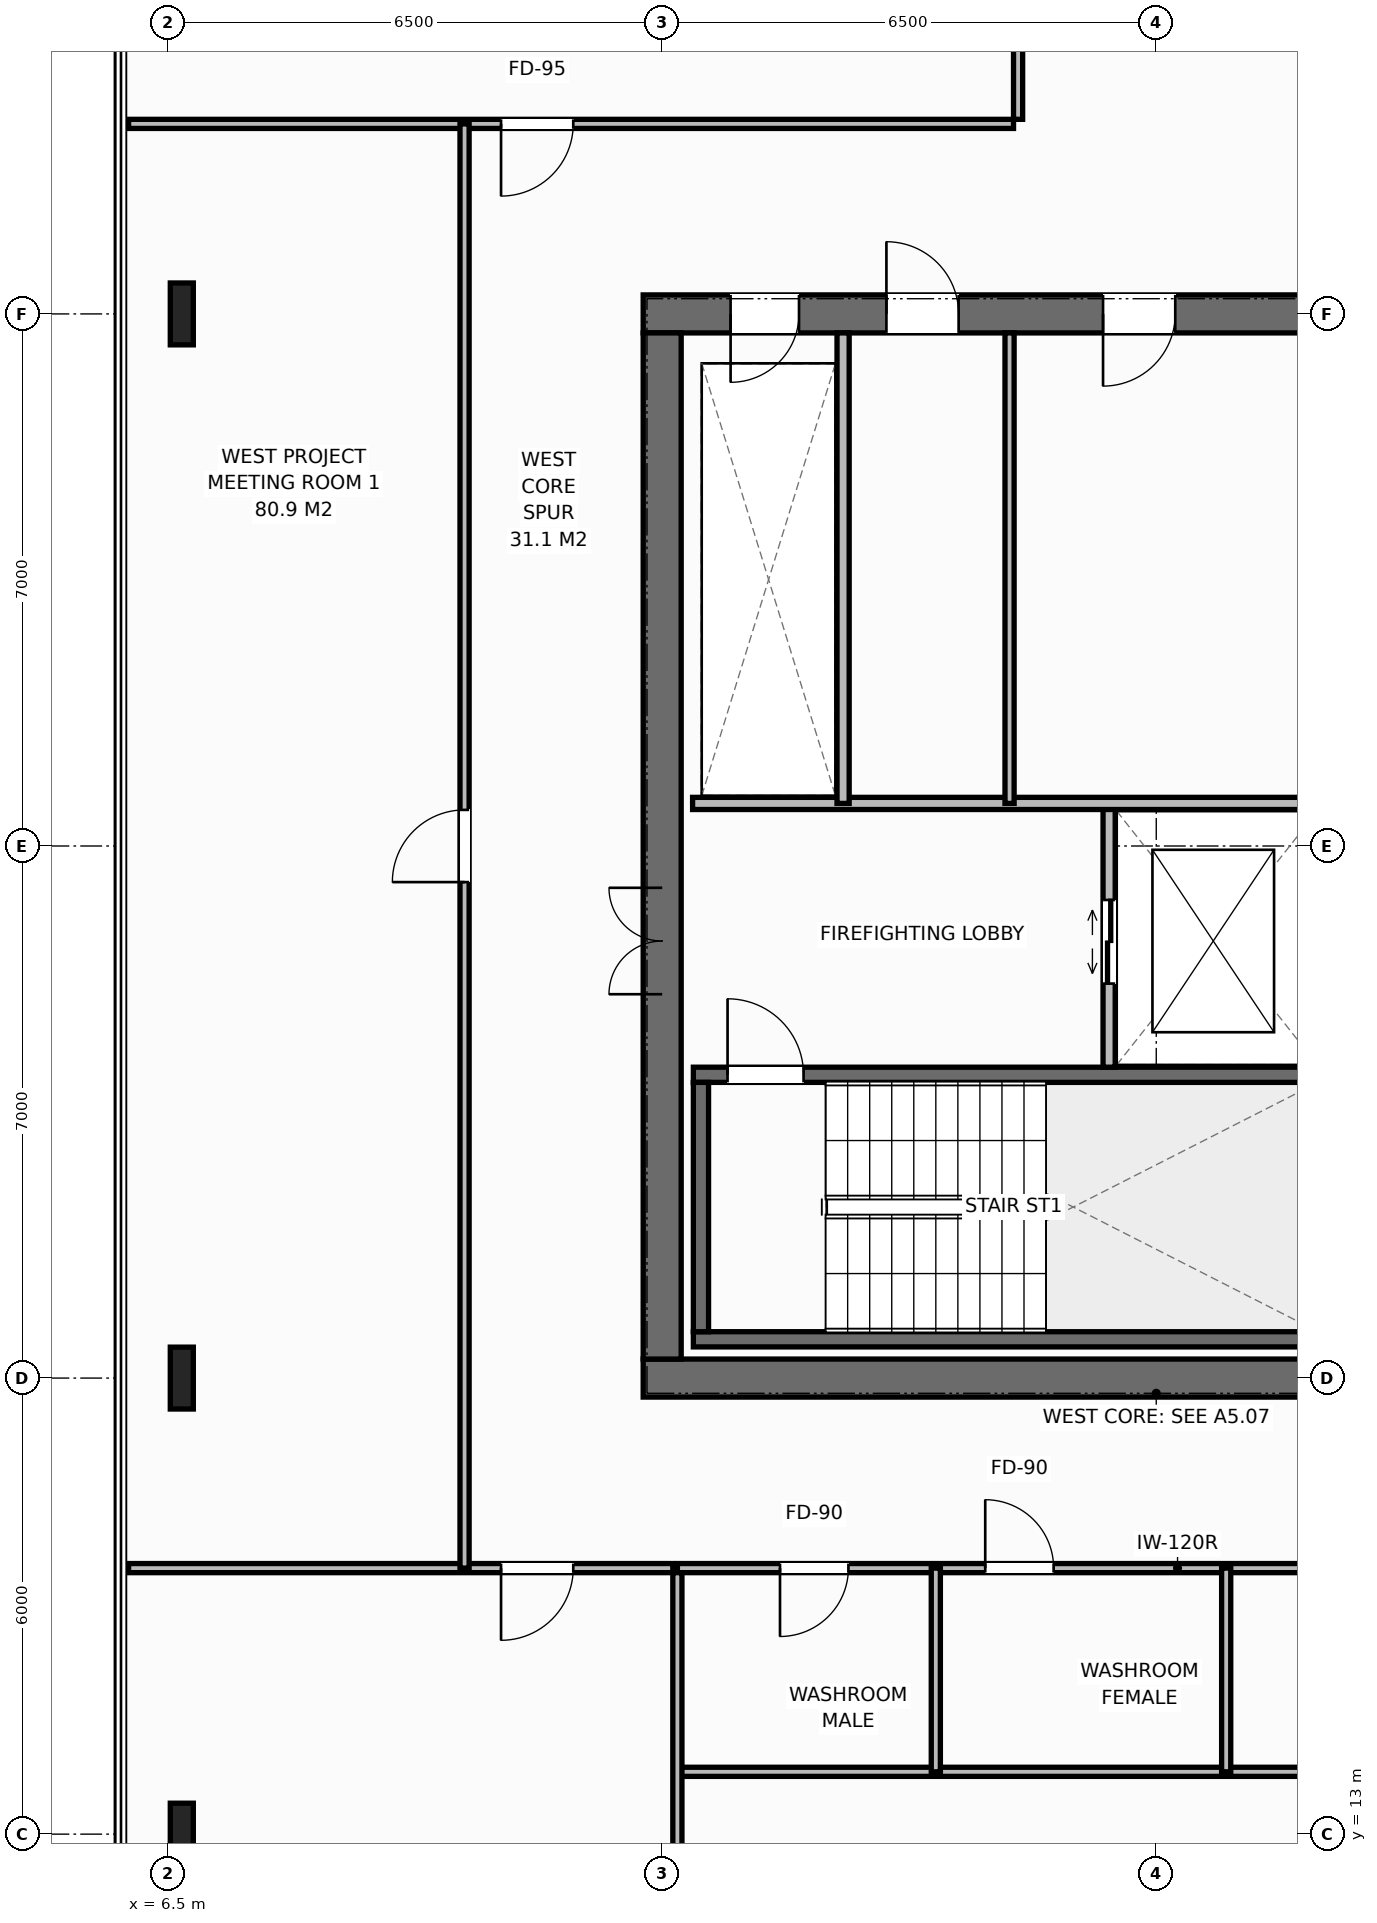
"""IFC4 building model, lengths in metres.
Left out: names, types, materials, properties, quantities, classifications, styles, units other than length and angle.
Written with IfcOpenShell. Run it as: python <this file> out.ifc"""

import sys

from ifc_helpers import new_model, si_unit, direction, frame, frame_2d, origin, origin_2d, place, context, subcontext, project, spatial, rectangle, i_section, extrude, element, fill, save


model = new_model("IFC4")
c1 = context("Model", 3, precision=1e-05, world=origin(), true_north=direction((0.0, 1.0)))
c2 = subcontext(c1, "Body", "Model", "MODEL_VIEW")
j1 = project(units=[si_unit("LENGTHUNIT", "METRE"), si_unit("PLANEANGLEUNIT", "RADIAN")], contexts=[c1])
p1 = place(None, origin())
s1 = spatial("IfcSite", under=j1, at=p1, CompositionType="ELEMENT")
p2 = place(p1, origin())
s2 = spatial("IfcBuilding", under=s1, at=p2, CompositionType="ELEMENT")
p3 = place(p2, frame((0.0, 0.0, 240.4)))
s3 = spatial("IfcBuildingStorey", under=s2, at=p3, CompositionType="ELEMENT", Elevation=240.4)
p4 = place(p3, frame((12.75, 19.0, 0.0), z_axis=(0.0, 0.0, 1.0), x_axis=(1.0, 0.0, 0.0)))
e1 = element("IfcWall", 1, at=p4, inside=s3, PredefinedType="SHEAR", context=c2, shape_type="SweptSolid", body=[
    extrude(rectangle(XDim=13.5, YDim=0.5, at=frame_2d((6.75, 0.0))), origin(), (0.0, 0.0, 1.0), 3.8),
])
p5 = place(p4, frame((9.13, 0.0, 0.0)))
e2 = element("IfcOpeningElement", 2, at=p5, cuts=e1, PredefinedType="OPENING", context=c2, shape_type="SweptSolid", body=[
    extrude(rectangle(XDim=1.4, YDim=2.2, at=frame_2d((0.7, 1.1))), frame((0.0, 0.26, 0.0), z_axis=(0.0, -1.0, 0.0), x_axis=(1.0, 0.0, 0.0)), (0.0, 0.0, 1.0), 0.52),
])
p6 = place(p3, frame((12.75, 33.0, 0.0), z_axis=(0.0, 0.0, 1.0), x_axis=(1.0, 0.0, 0.0)))
e3 = element("IfcWall", 3, at=p6, inside=s3, PredefinedType="SHEAR", context=c2, shape_type="SweptSolid", body=[
    extrude(rectangle(XDim=13.5, YDim=0.5, at=frame_2d((6.75, 0.0))), origin(), (0.0, 0.0, 1.0), 3.8),
])
p7 = place(p6, frame((1.15, 0.0, 0.0)))
e4 = element("IfcOpeningElement", 4, at=p7, cuts=e3, PredefinedType="OPENING", context=c2, shape_type="SweptSolid", body=[
    extrude(rectangle(XDim=0.9, YDim=2.15, at=frame_2d((0.45, 1.075))), frame((0.0, 0.26, 0.0), z_axis=(0.0, -1.0, 0.0), x_axis=(1.0, 0.0, 0.0)), (0.0, 0.0, 1.0), 0.52),
])
p8 = place(p6, frame((3.2, 0.0, 0.0)))
e5 = element("IfcOpeningElement", 5, at=p8, cuts=e3, PredefinedType="OPENING", context=c2, shape_type="SweptSolid", body=[
    extrude(rectangle(XDim=0.95, YDim=2.15, at=frame_2d((0.475, 1.075))), frame((0.0, 0.26, 0.0), z_axis=(0.0, -1.0, 0.0), x_axis=(1.0, 0.0, 0.0)), (0.0, 0.0, 1.0), 0.52),
])
p9 = place(p6, frame((6.05, 0.0, 0.0)))
e6 = element("IfcOpeningElement", 6, at=p9, cuts=e3, PredefinedType="OPENING", context=c2, shape_type="SweptSolid", body=[
    extrude(rectangle(XDim=0.95, YDim=2.15, at=frame_2d((0.475, 1.075))), frame((0.0, 0.26, 0.0), z_axis=(0.0, -1.0, 0.0), x_axis=(1.0, 0.0, 0.0)), (0.0, 0.0, 1.0), 0.52),
])
p10 = place(p6, frame((9.13, 0.0, 0.0)))
e7 = element("IfcOpeningElement", 7, at=p10, cuts=e3, PredefinedType="OPENING", context=c2, shape_type="SweptSolid", body=[
    extrude(rectangle(XDim=1.4, YDim=2.2, at=frame_2d((0.7, 1.1))), frame((0.0, 0.26, 0.0), z_axis=(0.0, -1.0, 0.0), x_axis=(1.0, 0.0, 0.0)), (0.0, 0.0, 1.0), 0.52),
])
p11 = place(p3, frame((13.0, 19.25, 0.0), z_axis=(0.0, 0.0, 1.0), x_axis=(0.0, 1.0, 0.0)))
e8 = element("IfcWall", 8, at=p11, inside=s3, PredefinedType="SHEAR", context=c2, shape_type="SweptSolid", body=[
    extrude(rectangle(XDim=13.5, YDim=0.5, at=frame_2d((6.75, 0.0))), origin(), (0.0, 0.0, 1.0), 3.8),
])
p12 = place(p11, frame((4.8, 0.0, 0.0)))
e9 = element("IfcOpeningElement", 9, at=p12, cuts=e8, PredefinedType="OPENING", context=c2, shape_type="SweptSolid", body=[
    extrude(rectangle(XDim=1.4, YDim=2.2, at=frame_2d((0.7, 1.1))), frame((0.0, 0.26, 0.0), z_axis=(0.0, -1.0, 0.0), x_axis=(1.0, 0.0, 0.0)), (0.0, 0.0, 1.0), 0.52),
])
p13 = place(p3, frame((13.41, 19.51, 0.0), z_axis=(0.0, 0.0, 1.0), x_axis=(1.0, 0.0, 0.0)))
e10 = element("IfcWall", 10, at=p13, inside=s3, PredefinedType="SHEAR", context=c2, shape_type="SweptSolid", body=[
    extrude(rectangle(XDim=8.43, YDim=0.2, at=frame_2d((4.215, 0.0))), origin(), (0.0, 0.0, 1.0), 3.8),
])
p14 = place(p3, frame((13.41, 22.99, 0.0), z_axis=(0.0, 0.0, 1.0), x_axis=(1.0, 0.0, 0.0)))
e11 = element("IfcWall", 11, at=p14, inside=s3, PredefinedType="SHEAR", context=c2, shape_type="SweptSolid", body=[
    extrude(rectangle(XDim=8.43, YDim=0.2, at=frame_2d((4.215, 0.0))), origin(), (0.0, 0.0, 1.0), 3.8),
])
p15 = place(p14, frame((0.45, 0.0, 0.0)))
e12 = element("IfcOpeningElement", 12, at=p15, cuts=e11, PredefinedType="OPENING", context=c2, shape_type="SweptSolid", body=[
    extrude(rectangle(XDim=1.0, YDim=2.15, at=frame_2d((0.5, 1.075))), frame((0.0, 0.11, 0.0), z_axis=(0.0, -1.0, 0.0), x_axis=(1.0, 0.0, 0.0)), (0.0, 0.0, 1.0), 0.22),
])
p16 = place(p3, frame((13.51, 19.61, 0.0), z_axis=(0.0, 0.0, 1.0), x_axis=(0.0, 1.0, 0.0)))
e13 = element("IfcWall", 13, at=p16, inside=s3, PredefinedType="SHEAR", context=c2, shape_type="SweptSolid", body=[
    extrude(rectangle(XDim=3.28, YDim=0.2, at=frame_2d((1.64, 0.0))), origin(), (0.0, 0.0, 1.0), 3.8),
])
for number, where, z_axis, x_axis in (
    (14, (6.68, 13.0, 0.0), (0.0, 0.0, 1.0), (1.0, 0.0, 0.0)),
    (15, (6.68, 19.0, 0.0), (0.0, 0.0, 1.0), (1.0, 0.0, 0.0)),
    (16, (6.68, 33.0, 0.0), (0.0, 0.0, 1.0), (1.0, 0.0, 0.0)),
):
    element("IfcColumn", number, at=place(p3, frame(where, z_axis=z_axis, x_axis=x_axis)), inside=s3, PredefinedType="COLUMN", context=c2, shape_type="SweptSolid", body=[
        extrude(i_section(OverallWidth=0.303, OverallDepth=0.814, WebThickness=0.021, FlangeThickness=0.04, at=origin_2d()), origin(), (0.0, 0.0, 1.0), 3.8),
    ])
p17 = place(p3, frame((18.88, 23.09, 0.0), z_axis=(0.0, 0.0, 1.0), x_axis=(0.0, 1.0, 0.0)))
e17 = element("IfcWall", 17, at=p17, inside=s3, PredefinedType="STANDARD", context=c2, shape_type="SweptSolid", body=[
    extrude(rectangle(XDim=3.47, YDim=0.16, at=frame_2d((1.735, 0.0))), origin(), (0.0, 0.0, 1.0), 3.58),
])
p18 = place(p17, frame((1.1, 0.0, 0.0)))
e18 = element("IfcOpeningElement", 18, at=p18, cuts=e17, PredefinedType="OPENING", context=c2, shape_type="SweptSolid", body=[
    extrude(rectangle(XDim=1.1, YDim=2.2, at=frame_2d((0.55, 1.1))), frame((0.0, 0.09, 0.0), z_axis=(0.0, -1.0, 0.0), x_axis=(1.0, 0.0, 0.0)), (0.0, 0.0, 1.0), 0.18),
])
p19 = place(p3, frame((13.4, 26.56, 0.0), z_axis=(0.0, 0.0, 1.0), x_axis=(1.0, 0.0, 0.0)))
e19 = element("IfcWall", 19, at=p19, inside=s3, PredefinedType="STANDARD", context=c2, shape_type="SweptSolid", body=[
    extrude(rectangle(XDim=8.34, YDim=0.16, at=frame_2d((4.17, 0.0))), origin(), (0.0, 0.0, 1.0), 3.58),
])
p20 = place(p3, frame((15.38, 26.56, 0.0), z_axis=(0.0, 0.0, 1.0), x_axis=(0.0, 1.0, 0.0)))
e20 = element("IfcWall", 20, at=p20, inside=s3, PredefinedType="STANDARD", context=c2, shape_type="SweptSolid", body=[
    extrude(rectangle(XDim=6.19, YDim=0.16, at=frame_2d((3.095, 0.0))), origin(), (0.0, 0.0, 1.0), 3.58),
])
p21 = place(p3, frame((17.57, 26.56, 0.0), z_axis=(0.0, 0.0, 1.0), x_axis=(0.0, 1.0, 0.0)))
e21 = element("IfcWall", 21, at=p21, inside=s3, PredefinedType="PARTITIONING", context=c2, shape_type="SweptSolid", body=[
    extrude(rectangle(XDim=6.19, YDim=0.12, at=frame_2d((3.095, 0.0))), origin(), (0.0, 0.0, 1.0), 3.58),
])
p22 = place(p3, frame((13.2, 16.5, 0.0), z_axis=(0.0, 0.0, 1.0), x_axis=(1.0, 0.0, 0.0)))
e22 = element("IfcWall", 22, at=p22, inside=s3, PredefinedType="PARTITIONING", context=c2, shape_type="SweptSolid", body=[
    extrude(rectangle(XDim=13.16, YDim=0.12, at=frame_2d((6.58, 0.0))), origin(), (0.0, 0.0, 1.0), 3.58),
])
p23 = place(p22, frame((1.35, 0.0, 0.0)))
e23 = element("IfcOpeningElement", 23, at=p23, cuts=e22, PredefinedType="OPENING", context=c2, shape_type="SweptSolid", body=[
    extrude(rectangle(XDim=0.9, YDim=2.15, at=frame_2d((0.45, 1.075))), frame((0.0, 0.07, 0.0), z_axis=(0.0, -1.0, 0.0), x_axis=(1.0, 0.0, 0.0)), (0.0, 0.0, 1.0), 0.14),
])
p24 = place(p22, frame((4.05, 0.0, 0.0)))
e24 = element("IfcOpeningElement", 24, at=p24, cuts=e22, PredefinedType="OPENING", context=c2, shape_type="SweptSolid", body=[
    extrude(rectangle(XDim=0.9, YDim=2.15, at=frame_2d((0.45, 1.075))), frame((0.0, 0.07, 0.0), z_axis=(0.0, -1.0, 0.0), x_axis=(1.0, 0.0, 0.0)), (0.0, 0.0, 1.0), 0.14),
])
p25 = place(p22, frame((8.25, 0.0, 0.0)))
e25 = element("IfcOpeningElement", 25, at=p25, cuts=e22, PredefinedType="OPENING", context=c2, shape_type="SweptSolid", body=[
    extrude(rectangle(XDim=0.9, YDim=2.15, at=frame_2d((0.45, 1.075))), frame((0.0, 0.07, 0.0), z_axis=(0.0, -1.0, 0.0), x_axis=(1.0, 0.0, 0.0)), (0.0, 0.0, 1.0), 0.14),
])
p26 = place(p22, frame((11.0, 0.0, 0.0)))
e26 = element("IfcOpeningElement", 26, at=p26, cuts=e22, PredefinedType="OPENING", context=c2, shape_type="SweptSolid", body=[
    extrude(rectangle(XDim=0.95, YDim=2.15, at=frame_2d((0.475, 1.075))), frame((0.0, 0.07, 0.0), z_axis=(0.0, -1.0, 0.0), x_axis=(1.0, 0.0, 0.0)), (0.0, 0.0, 1.0), 0.14),
])
p27 = place(p3, frame((13.2, 13.82, 0.0), z_axis=(0.0, 0.0, 1.0), x_axis=(1.0, 0.0, 0.0)))
e27 = element("IfcWall", 27, at=p27, inside=s3, PredefinedType="PARTITIONING", context=c2, shape_type="SweptSolid", body=[
    extrude(rectangle(XDim=13.16, YDim=0.12, at=frame_2d((6.58, 0.0))), origin(), (0.0, 0.0, 1.0), 3.58),
])
for number, where, z_axis, x_axis in (
    (28, (16.6, 13.82, 0.0), (0.0, 0.0, 1.0), (0.0, 1.0, 0.0)),
    (29, (20.42, 13.82, 0.0), (0.0, 0.0, 1.0), (0.0, 1.0, 0.0)),
):
    element("IfcWall", number, at=place(p3, frame(where, z_axis=z_axis, x_axis=x_axis)), inside=s3, PredefinedType="PARTITIONING", context=c2, shape_type="SweptSolid", body=[
        extrude(rectangle(XDim=2.68, YDim=0.12, at=frame_2d((1.34, 0.0))), origin(), (0.0, 0.0, 1.0), 3.58),
    ])
p28 = place(p3, frame((17.682, 35.56, 0.0), z_axis=(0.0, 0.0, 1.0), x_axis=(0.0, 1.0, 0.0)))
e30 = element("IfcWall", 30, at=p28, inside=s3, PredefinedType="PARTITIONING", context=c2, shape_type="SweptSolid", body=[
    extrude(rectangle(XDim=11.42, YDim=0.12, at=frame_2d((5.71, 0.0))), origin(), (0.0, 0.0, 1.0), 3.58),
])
p29 = place(p3, frame((5.98, 35.5, 0.0), z_axis=(0.0, 0.0, 1.0), x_axis=(1.0, 0.0, 0.0)))
e31 = element("IfcWall", 31, at=p29, inside=s3, PredefinedType="PARTITIONING", context=c2, shape_type="SweptSolid", body=[
    extrude(rectangle(XDim=11.642, YDim=0.12, at=frame_2d((5.821, 0.0))), origin(), (0.0, 0.0, 1.0), 3.58),
])
p30 = place(p29, frame((4.9, 0.0, 0.0)))
e32 = element("IfcOpeningElement", 32, at=p30, cuts=e31, PredefinedType="OPENING", context=c2, shape_type="SweptSolid", body=[
    extrude(rectangle(XDim=0.95, YDim=2.15, at=frame_2d((0.475, 1.075))), frame((0.0, 0.07, 0.0), z_axis=(0.0, -1.0, 0.0), x_axis=(1.0, 0.0, 0.0)), (0.0, 0.0, 1.0), 0.14),
])
p31 = place(p3, frame((13.2, 5.02, 0.0), z_axis=(0.0, 0.0, 1.0), x_axis=(0.0, 1.0, 0.0)))
e33 = element("IfcWall", 33, at=p31, inside=s3, PredefinedType="PARTITIONING", context=c2, shape_type="SweptSolid", body=[
    extrude(rectangle(XDim=11.42, YDim=0.12, at=frame_2d((5.71, 0.0))), origin(), (0.0, 0.0, 1.0), 2.88),
])
p32 = place(p3, frame((5.98, 16.5, 0.0), z_axis=(0.0, 0.0, 1.0), x_axis=(1.0, 0.0, 0.0)))
e34 = element("IfcWall", 34, at=p32, inside=s3, PredefinedType="PARTITIONING", context=c2, shape_type="SweptSolid", body=[
    extrude(rectangle(XDim=7.16, YDim=0.12, at=frame_2d((3.58, 0.0))), origin(), (0.0, 0.0, 1.0), 3.58),
])
p33 = place(p32, frame((4.9, 0.0, 0.0)))
e35 = element("IfcOpeningElement", 35, at=p33, cuts=e34, PredefinedType="OPENING", context=c2, shape_type="SweptSolid", body=[
    extrude(rectangle(XDim=0.95, YDim=2.15, at=frame_2d((0.475, 1.075))), frame((0.0, 0.07, 0.0), z_axis=(0.0, -1.0, 0.0), x_axis=(1.0, 0.0, 0.0)), (0.0, 0.0, 1.0), 0.14),
])
p34 = place(p3, frame((10.4, 16.5, 0.0), z_axis=(0.0, 0.0, 1.0), x_axis=(0.0, 1.0, 0.0)))
e36 = element("IfcWall", 36, at=p34, inside=s3, PredefinedType="PARTITIONING", context=c2, shape_type="SweptSolid", body=[
    extrude(rectangle(XDim=19.0, YDim=0.12, at=frame_2d((9.5, 0.0))), origin(), (0.0, 0.0, 1.0), 3.58),
])
p35 = place(p34, frame((9.025, 0.0, 0.0)))
e37 = element("IfcOpeningElement", 37, at=p35, cuts=e36, PredefinedType="OPENING", context=c2, shape_type="SweptSolid", body=[
    extrude(rectangle(XDim=0.95, YDim=2.15, at=frame_2d((0.475, 1.075))), frame((0.0, 0.07, 0.0), z_axis=(0.0, -1.0, 0.0), x_axis=(1.0, 0.0, 0.0)), (0.0, 0.0, 1.0), 0.14),
])
p36 = place(p15, origin())
e38 = element("IfcDoor", 38, at=p36, inside=s3, OperationType="SINGLE_SWING_LEFT", PredefinedType="DOOR", context=c2, shape_type="SweptSolid", body=[
    extrude(rectangle(XDim=1.0, YDim=2.15, at=frame_2d((0.5, 1.075))), frame((0.0, 0.025, 0.0), z_axis=(0.0, -1.0, 0.0), x_axis=(1.0, 0.0, 0.0)), (0.0, 0.0, 1.0), 0.05),
])
fill(e12, e38)
p37 = place(p12, origin())
e39 = element("IfcDoor", 39, at=p37, inside=s3, OperationType="DOUBLE_DOOR_SINGLE_SWING", PredefinedType="DOOR", context=c2, shape_type="SweptSolid", body=[
    extrude(rectangle(XDim=1.4, YDim=2.2, at=frame_2d((0.7, 1.1))), frame((0.0, 0.025, 0.0), z_axis=(0.0, -1.0, 0.0), x_axis=(1.0, 0.0, 0.0)), (0.0, 0.0, 1.0), 0.05),
])
fill(e9, e39)
p38 = place(p18, origin())
e40 = element("IfcDoor", 40, at=p38, inside=s3, OperationType="DOUBLE_DOOR_SLIDING", PredefinedType="DOOR", context=c2, shape_type="SweptSolid", body=[
    extrude(rectangle(XDim=1.1, YDim=2.2, at=frame_2d((0.55, 1.1))), frame((0.0, 0.025, 0.0), z_axis=(0.0, -1.0, 0.0), x_axis=(1.0, 0.0, 0.0)), (0.0, 0.0, 1.0), 0.05),
])
fill(e18, e40)
p39 = place(p7, origin())
e41 = element("IfcDoor", 41, at=p39, inside=s3, OperationType="SINGLE_SWING_RIGHT", PredefinedType="DOOR", context=c2, shape_type="SweptSolid", body=[
    extrude(rectangle(XDim=0.9, YDim=2.15, at=frame_2d((0.45, 1.075))), frame((0.0, -0.025, 0.0), z_axis=(0.0, -1.0, 0.0), x_axis=(1.0, 0.0, 0.0)), (0.0, 0.0, 1.0), 0.05),
])
fill(e4, e41)
p40 = place(p8, origin())
e42 = element("IfcDoor", 42, at=p40, inside=s3, OperationType="SINGLE_SWING_LEFT", PredefinedType="DOOR", context=c2, shape_type="SweptSolid", body=[
    extrude(rectangle(XDim=0.95, YDim=2.15, at=frame_2d((0.475, 1.075))), frame((0.0, -0.025, 0.0), z_axis=(0.0, -1.0, 0.0), x_axis=(1.0, 0.0, 0.0)), (0.0, 0.0, 1.0), 0.05),
])
fill(e5, e42)
p41 = place(p9, origin())
e43 = element("IfcDoor", 43, at=p41, inside=s3, OperationType="SINGLE_SWING_RIGHT", PredefinedType="DOOR", context=c2, shape_type="SweptSolid", body=[
    extrude(rectangle(XDim=0.95, YDim=2.15, at=frame_2d((0.475, 1.075))), frame((0.0, -0.025, 0.0), z_axis=(0.0, -1.0, 0.0), x_axis=(1.0, 0.0, 0.0)), (0.0, 0.0, 1.0), 0.05),
])
fill(e6, e43)
p42 = place(p23, origin())
e44 = element("IfcDoor", 44, at=p42, inside=s3, OperationType="SINGLE_SWING_RIGHT", PredefinedType="DOOR", context=c2, shape_type="SweptSolid", body=[
    extrude(rectangle(XDim=0.9, YDim=2.15, at=frame_2d((0.45, 1.075))), frame((0.0, 0.025, 0.0), z_axis=(0.0, -1.0, 0.0), x_axis=(1.0, 0.0, 0.0)), (0.0, 0.0, 1.0), 0.05),
])
fill(e23, e44)
p43 = place(p24, origin())
e45 = element("IfcDoor", 45, at=p43, inside=s3, OperationType="SINGLE_SWING_LEFT", PredefinedType="DOOR", context=c2, shape_type="SweptSolid", body=[
    extrude(rectangle(XDim=0.9, YDim=2.15, at=frame_2d((0.45, 1.075))), frame((0.0, 0.025, 0.0), z_axis=(0.0, -1.0, 0.0), x_axis=(1.0, 0.0, 0.0)), (0.0, 0.0, 1.0), 0.05),
])
fill(e24, e45)
p44 = place(p30, origin())
e46 = element("IfcDoor", 46, at=p44, inside=s3, OperationType="SINGLE_SWING_RIGHT", PredefinedType="DOOR", context=c2, shape_type="SweptSolid", body=[
    extrude(rectangle(XDim=0.95, YDim=2.15, at=frame_2d((0.475, 1.075))), frame((0.0, 0.025, 0.0), z_axis=(0.0, -1.0, 0.0), x_axis=(1.0, 0.0, 0.0)), (0.0, 0.0, 1.0), 0.05),
])
fill(e32, e46)
p45 = place(p33, origin())
e47 = element("IfcDoor", 47, at=p45, inside=s3, OperationType="SINGLE_SWING_RIGHT", PredefinedType="DOOR", context=c2, shape_type="SweptSolid", body=[
    extrude(rectangle(XDim=0.95, YDim=2.15, at=frame_2d((0.475, 1.075))), frame((0.0, 0.025, 0.0), z_axis=(0.0, -1.0, 0.0), x_axis=(1.0, 0.0, 0.0)), (0.0, 0.0, 1.0), 0.05),
])
fill(e35, e47)
p46 = place(p35, origin())
e48 = element("IfcDoor", 48, at=p46, inside=s3, OperationType="SINGLE_SWING_LEFT", PredefinedType="DOOR", context=c2, shape_type="SweptSolid", body=[
    extrude(rectangle(XDim=0.95, YDim=2.15, at=frame_2d((0.475, 1.075))), frame((0.0, 0.025, 0.0), z_axis=(0.0, -1.0, 0.0), x_axis=(1.0, 0.0, 0.0)), (0.0, 0.0, 1.0), 0.05),
])
fill(e37, e48)
save(model, sys.argv[1])
